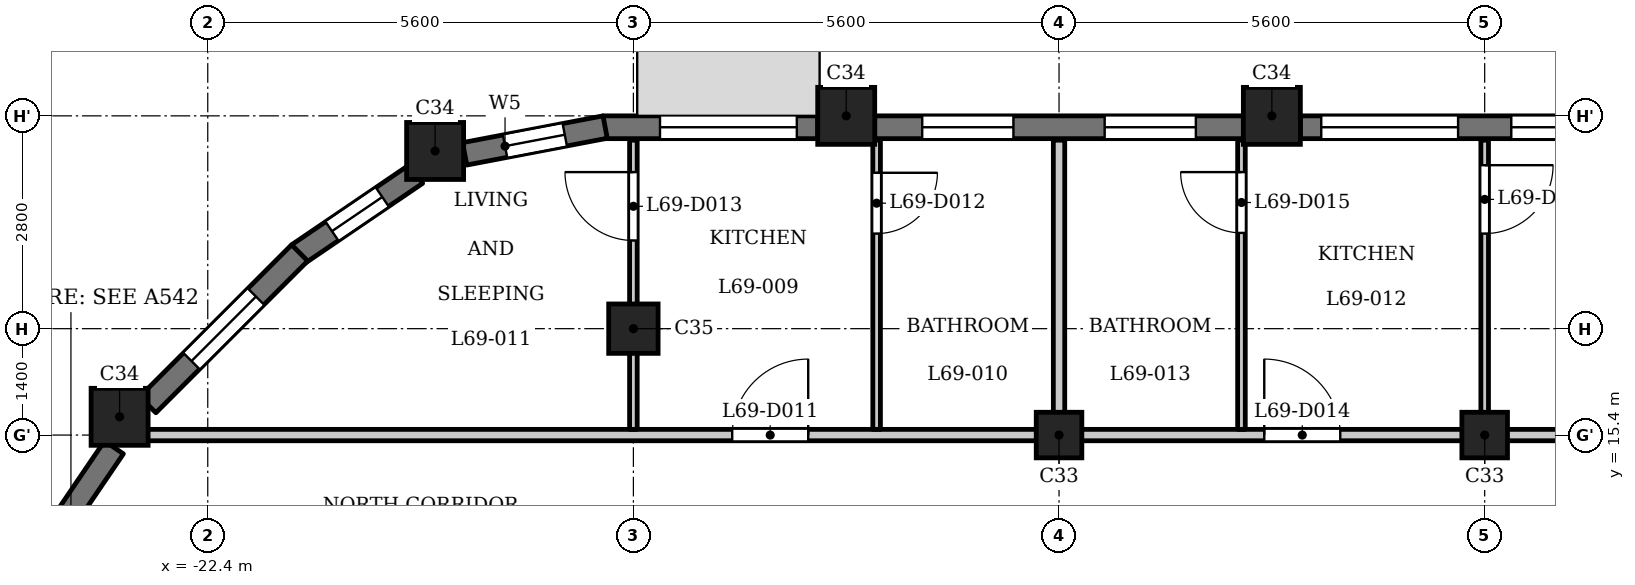
"""IFC4 building model, lengths in metres.
Left out: names, types, materials, properties, quantities, classifications, styles, units other than length and angle.
Written with IfcOpenShell. Run it as: python <this file> out.ifc"""

import sys

from ifc_helpers import new_model, si_unit, direction, frame, frame_2d, origin, origin_2d, place, context, subcontext, project, spatial, rectangle, extrude, element, fill, save


model = new_model("IFC4")
c1 = context("Model", 3, precision=1e-05, world=origin(), true_north=direction((0.0, 1.0)))
c2 = subcontext(c1, "Body", "Model", "MODEL_VIEW")
j1 = project(units=[si_unit("LENGTHUNIT", "METRE"), si_unit("PLANEANGLEUNIT", "RADIAN")], contexts=[c1])
p1 = place(None, origin())
s1 = spatial("IfcSite", under=j1, at=p1, CompositionType="ELEMENT")
p2 = place(p1, origin())
s2 = spatial("IfcBuilding", under=s1, at=p2, CompositionType="ELEMENT")
p3 = place(p2, frame((0.0, 0.0, 266.2)))
s3 = spatial("IfcBuildingStorey", under=s2, at=p3, CompositionType="ELEMENT", Elevation=266.2)
for number, where, z_axis, x_axis in (
    (1, (-8.4, 19.6, 0.0), (0.0, 0.0, 1.0), (1.0, 0.0, 0.0)),
    (2, (-14.0, 19.6, 0.0), (0.0, 0.0, 1.0), (1.0, 0.0, 0.0)),
    (3, (-19.409, 19.138, 0.0), (0.0, 0.0, 1.0), (1.0, 0.0, 0.0)),
    (4, (-23.56, 15.64, 0.0), (0.0, 0.0, 1.0), (1.0, 0.0, 0.0)),
):
    element("IfcColumn", number, at=place(p3, frame(where, z_axis=z_axis, x_axis=x_axis)), inside=s3, PredefinedType="COLUMN", context=c2, shape_type="SweptSolid", body=[
        extrude(rectangle(XDim=0.75, YDim=0.75, at=origin_2d()), origin(), (0.0, 0.0, 1.0), 3.5),
    ])
p4 = place(p3, frame((-16.8, 16.8, 0.0), z_axis=(0.0, 0.0, 1.0), x_axis=(1.0, 0.0, 0.0)))
e5 = element("IfcColumn", 5, at=p4, inside=s3, PredefinedType="COLUMN", context=c2, shape_type="SweptSolid", body=[
    extrude(rectangle(XDim=0.65, YDim=0.65, at=origin_2d()), origin(), (0.0, 0.0, 1.0), 3.5),
])
for number, where, z_axis, x_axis in (
    (6, (-11.2, 15.4, 0.0), (0.0, 0.0, 1.0), (1.0, 0.0, 0.0)),
    (7, (-5.6, 15.4, 0.0), (0.0, 0.0, 1.0), (1.0, 0.0, 0.0)),
):
    element("IfcColumn", number, at=place(p3, frame(where, z_axis=z_axis, x_axis=x_axis)), inside=s3, PredefinedType="COLUMN", context=c2, shape_type="SweptSolid", body=[
        extrude(rectangle(XDim=0.6, YDim=0.6, at=origin_2d()), origin(), (0.0, 0.0, 1.0), 3.5),
    ])
p5 = place(p3, frame((-3.175, 19.45, 0.0), z_axis=(0.0, 0.0, 1.0), x_axis=(-1.0, 0.0, 0.0)))
e8 = element("IfcWall", 8, at=p5, inside=s3, PredefinedType="SOLIDWALL", context=c2, shape_type="SweptSolid", body=[
    extrude(rectangle(XDim=4.85, YDim=0.3, at=frame_2d((2.425, 0.0))), origin(), (0.0, 0.0, 1.0), 2.55),
])
p6 = place(p5, frame((0.275, 0.0, 0.9)))
e9 = element("IfcOpeningElement", 9, at=p6, cuts=e8, PredefinedType="OPENING", context=c2, shape_type="SweptSolid", body=[
    extrude(rectangle(XDim=1.8, YDim=1.25, at=frame_2d((0.9, 0.625))), frame((0.0, 0.16, 0.0), z_axis=(0.0, -1.0, 0.0), x_axis=(1.0, 0.0, 0.0)), (0.0, 0.0, 1.0), 0.32),
])
p7 = place(p5, frame((2.775, 0.0, 0.9)))
e10 = element("IfcOpeningElement", 10, at=p7, cuts=e8, PredefinedType="OPENING", context=c2, shape_type="SweptSolid", body=[
    extrude(rectangle(XDim=1.8, YDim=1.25, at=frame_2d((0.9, 0.625))), frame((0.0, 0.16, 0.0), z_axis=(0.0, -1.0, 0.0), x_axis=(1.0, 0.0, 0.0)), (0.0, 0.0, 1.0), 0.32),
])
p8 = place(p3, frame((-8.775, 19.45, 0.0), z_axis=(0.0, 0.0, 1.0), x_axis=(-1.0, 0.0, 0.0)))
e11 = element("IfcWall", 11, at=p8, inside=s3, PredefinedType="SOLIDWALL", context=c2, shape_type="SweptSolid", body=[
    extrude(rectangle(XDim=4.85, YDim=0.3, at=frame_2d((2.425, 0.0))), origin(), (0.0, 0.0, 1.0), 2.55),
])
p9 = place(p8, frame((0.625, 0.0, 0.6)))
e12 = element("IfcOpeningElement", 12, at=p9, cuts=e11, PredefinedType="OPENING", context=c2, shape_type="SweptSolid", body=[
    extrude(rectangle(XDim=1.2, YDim=1.55, at=frame_2d((0.6, 0.775))), frame((0.0, 0.16, 0.0), z_axis=(0.0, -1.0, 0.0), x_axis=(1.0, 0.0, 0.0)), (0.0, 0.0, 1.0), 0.32),
])
p10 = place(p8, frame((3.025, 0.0, 0.6)))
e13 = element("IfcOpeningElement", 13, at=p10, cuts=e11, PredefinedType="OPENING", context=c2, shape_type="SweptSolid", body=[
    extrude(rectangle(XDim=1.2, YDim=1.55, at=frame_2d((0.6, 0.775))), frame((0.0, 0.16, 0.0), z_axis=(0.0, -1.0, 0.0), x_axis=(1.0, 0.0, 0.0)), (0.0, 0.0, 1.0), 0.32),
])
p11 = place(p3, frame((-14.375, 19.45, 0.0), z_axis=(0.0, 0.0, 1.0), x_axis=(-1.0, 0.0, 0.0)))
e14 = element("IfcWall", 14, at=p11, inside=s3, PredefinedType="SOLIDWALL", context=c2, shape_type="SweptSolid", body=[
    extrude(rectangle(XDim=2.825, YDim=0.3, at=frame_2d((1.413, 0.0))), origin(), (0.0, 0.0, 1.0), 2.55),
])
p12 = place(p11, frame((0.275, 0.0, 0.9)))
e15 = element("IfcOpeningElement", 15, at=p12, cuts=e14, PredefinedType="OPENING", context=c2, shape_type="SweptSolid", body=[
    extrude(rectangle(XDim=1.8, YDim=1.25, at=frame_2d((0.9, 0.625))), frame((0.0, 0.16, 0.0), z_axis=(0.0, -1.0, 0.0), x_axis=(1.0, 0.0, 0.0)), (0.0, 0.0, 1.0), 0.32),
])
p13 = place(p3, frame((-17.172, 19.453, 0.0), z_axis=(0.0, 0.0, 1.0), x_axis=(-0.982284001233, -0.187398348234, 0.0)))
e16 = element("IfcWall", 16, at=p13, inside=s3, PredefinedType="SOLIDWALL", context=c2, shape_type="SweptSolid", body=[
    extrude(rectangle(XDim=1.881, YDim=0.3, at=frame_2d((0.941, 0.0))), origin(), (0.0, 0.0, 1.0), 2.55),
])
p14 = place(p13, frame((0.541, 0.0, 0.6)))
e17 = element("IfcOpeningElement", 17, at=p14, cuts=e16, PredefinedType="OPENING", context=c2, shape_type="SweptSolid", body=[
    extrude(rectangle(XDim=0.8, YDim=1.55, at=frame_2d((0.4, 0.775))), frame((0.0, 0.16, 0.0), z_axis=(0.0, -1.0, 0.0), x_axis=(1.0, 0.0, 0.0)), (0.0, 0.0, 1.0), 0.32),
])
p15 = place(p3, frame((-19.657, 18.836, 0.0), z_axis=(0.0, 0.0, 1.0), x_axis=(-0.82704477487, -0.562136051469, 0.0)))
e18 = element("IfcWall", 18, at=p15, inside=s3, PredefinedType="SOLIDWALL", context=c2, shape_type="SweptSolid", body=[
    extrude(rectangle(XDim=1.881, YDim=0.3, at=frame_2d((0.94, 0.0))), origin(), (0.0, 0.0, 1.0), 2.55),
])
p16 = place(p15, frame((0.541, 0.0, 0.6)))
e19 = element("IfcOpeningElement", 19, at=p16, cuts=e18, PredefinedType="OPENING", context=c2, shape_type="SweptSolid", body=[
    extrude(rectangle(XDim=0.8, YDim=1.55, at=frame_2d((0.4, 0.775))), frame((0.0, 0.16, 0.0), z_axis=(0.0, -1.0, 0.0), x_axis=(1.0, 0.0, 0.0)), (0.0, 0.0, 1.0), 0.32),
])
p17 = place(p3, frame((-21.191, 17.797, 0.0), z_axis=(0.0, 0.0, 1.0), x_axis=(-0.707106781187, -0.707106781187, 0.0)))
e20 = element("IfcWall", 20, at=p17, inside=s3, PredefinedType="SOLIDWALL", context=c2, shape_type="SweptSolid", body=[
    extrude(rectangle(XDim=2.825, YDim=0.3, at=frame_2d((1.413, 0.0))), origin(), (0.0, 0.0, 1.0), 2.55),
])
p18 = place(p17, frame((0.812, 0.0, 0.6)))
e21 = element("IfcOpeningElement", 21, at=p18, cuts=e20, PredefinedType="OPENING", context=c2, shape_type="SweptSolid", body=[
    extrude(rectangle(XDim=1.2, YDim=1.55, at=frame_2d((0.6, 0.775))), frame((0.0, 0.16, 0.0), z_axis=(0.0, -1.0, 0.0), x_axis=(1.0, 0.0, 0.0)), (0.0, 0.0, 1.0), 0.32),
])
p19 = place(p3, frame((-23.634, 15.237, 0.0), z_axis=(0.0, 0.0, 1.0), x_axis=(-0.562099454787, -0.827069648173, 0.0)))
e22 = element("IfcWall", 22, at=p19, inside=s3, PredefinedType="SOLIDWALL", context=c2, shape_type="SweptSolid", body=[
    extrude(rectangle(XDim=1.427, YDim=0.3, at=frame_2d((0.714, 0.0))), origin(), (0.0, 0.0, 1.0), 2.55),
])
p20 = place(p3, frame((-23.55, 15.4, 0.0), z_axis=(0.0, 0.0, 1.0), x_axis=(1.0, 0.0, 0.0)))
e23 = element("IfcWall", 23, at=p20, inside=s3, PredefinedType="PARTITIONING", context=c2, shape_type="SweptSolid", body=[
    extrude(rectangle(XDim=46.872, YDim=0.15, at=frame_2d((23.436, 0.0))), origin(), (0.0, 0.0, 1.0), 3.2),
])
p21 = place(p20, frame((8.05, 0.0, 0.0)))
e24 = element("IfcOpeningElement", 24, at=p21, cuts=e23, PredefinedType="OPENING", context=c2, shape_type="SweptSolid", body=[
    extrude(rectangle(XDim=1.0, YDim=2.1, at=frame_2d((0.5, 1.05))), frame((0.0, 0.085, 0.0), z_axis=(0.0, -1.0, 0.0), x_axis=(1.0, 0.0, 0.0)), (0.0, 0.0, 1.0), 0.17),
])
p22 = place(p20, frame((15.05, 0.0, 0.0)))
e25 = element("IfcOpeningElement", 25, at=p22, cuts=e23, PredefinedType="OPENING", context=c2, shape_type="SweptSolid", body=[
    extrude(rectangle(XDim=1.0, YDim=2.1, at=frame_2d((0.5, 1.05))), frame((0.0, 0.085, 0.0), z_axis=(0.0, -1.0, 0.0), x_axis=(1.0, 0.0, 0.0)), (0.0, 0.0, 1.0), 0.17),
])
p23 = place(p20, frame((26.25, 0.0, 0.0)))
e26 = element("IfcOpeningElement", 26, at=p23, cuts=e23, PredefinedType="OPENING", context=c2, shape_type="SweptSolid", body=[
    extrude(rectangle(XDim=1.0, YDim=2.1, at=frame_2d((0.5, 1.05))), frame((0.0, 0.085, 0.0), z_axis=(0.0, -1.0, 0.0), x_axis=(1.0, 0.0, 0.0)), (0.0, 0.0, 1.0), 0.17),
])
p24 = place(p20, frame((38.2, 0.0, 0.0)))
e27 = element("IfcOpeningElement", 27, at=p24, cuts=e23, PredefinedType="OPENING", context=c2, shape_type="SweptSolid", body=[
    extrude(rectangle(XDim=1.0, YDim=2.1, at=frame_2d((0.5, 1.05))), frame((0.0, 0.085, 0.0), z_axis=(0.0, -1.0, 0.0), x_axis=(1.0, 0.0, 0.0)), (0.0, 0.0, 1.0), 0.17),
])
p25 = place(p3, frame((-16.8, 15.475, 0.0), z_axis=(0.0, 0.0, 1.0), x_axis=(0.0, 1.0, 0.0)))
e28 = element("IfcWall", 28, at=p25, inside=s3, PredefinedType="PARTITIONING", context=c2, shape_type="SweptSolid", body=[
    extrude(rectangle(XDim=3.805, YDim=0.1, at=frame_2d((1.902, 0.0))), origin(), (0.0, 0.0, 1.0), 3.2),
])
p26 = place(p25, frame((2.485, 0.0, 0.0)))
e29 = element("IfcOpeningElement", 29, at=p26, cuts=e28, PredefinedType="OPENING", context=c2, shape_type="SweptSolid", body=[
    extrude(rectangle(XDim=0.9, YDim=2.1, at=frame_2d((0.45, 1.05))), frame((0.0, 0.06, 0.0), z_axis=(0.0, -1.0, 0.0), x_axis=(1.0, 0.0, 0.0)), (0.0, 0.0, 1.0), 0.12),
])
p27 = place(p3, frame((-13.6, 15.475, 0.0), z_axis=(0.0, 0.0, 1.0), x_axis=(0.0, 1.0, 0.0)))
e30 = element("IfcWall", 30, at=p27, inside=s3, PredefinedType="PARTITIONING", context=c2, shape_type="SweptSolid", body=[
    extrude(rectangle(XDim=3.805, YDim=0.1, at=frame_2d((1.902, 0.0))), origin(), (0.0, 0.0, 1.0), 3.2),
])
p28 = place(p27, frame((2.576, 0.0, 0.0)))
e31 = element("IfcOpeningElement", 31, at=p28, cuts=e30, PredefinedType="OPENING", context=c2, shape_type="SweptSolid", body=[
    extrude(rectangle(XDim=0.8, YDim=2.1, at=frame_2d((0.4, 1.05))), frame((0.0, 0.06, 0.0), z_axis=(0.0, -1.0, 0.0), x_axis=(1.0, 0.0, 0.0)), (0.0, 0.0, 1.0), 0.12),
])
p29 = place(p3, frame((-11.2, 15.475, 0.0), z_axis=(0.0, 0.0, 1.0), x_axis=(0.0, 1.0, 0.0)))
e32 = element("IfcWall", 32, at=p29, inside=s3, PredefinedType="PARTITIONING", context=c2, shape_type="SweptSolid", body=[
    extrude(rectangle(XDim=3.805, YDim=0.15, at=frame_2d((1.902, 0.0))), origin(), (0.0, 0.0, 1.0), 3.2),
])
p30 = place(p3, frame((-8.8, 15.475, 0.0), z_axis=(0.0, 0.0, 1.0), x_axis=(0.0, 1.0, 0.0)))
e33 = element("IfcWall", 33, at=p30, inside=s3, PredefinedType="PARTITIONING", context=c2, shape_type="SweptSolid", body=[
    extrude(rectangle(XDim=3.805, YDim=0.1, at=frame_2d((1.902, 0.0))), origin(), (0.0, 0.0, 1.0), 3.2),
])
p31 = place(p30, frame((2.585, 0.0, 0.0)))
e34 = element("IfcOpeningElement", 34, at=p31, cuts=e33, PredefinedType="OPENING", context=c2, shape_type="SweptSolid", body=[
    extrude(rectangle(XDim=0.8, YDim=2.1, at=frame_2d((0.4, 1.05))), frame((0.0, 0.06, 0.0), z_axis=(0.0, -1.0, 0.0), x_axis=(1.0, 0.0, 0.0)), (0.0, 0.0, 1.0), 0.12),
])
p32 = place(p3, frame((-5.6, 15.475, 0.0), z_axis=(0.0, 0.0, 1.0), x_axis=(0.0, 1.0, 0.0)))
e35 = element("IfcWall", 35, at=p32, inside=s3, PredefinedType="PARTITIONING", context=c2, shape_type="SweptSolid", body=[
    extrude(rectangle(XDim=3.805, YDim=0.1, at=frame_2d((1.902, 0.0))), origin(), (0.0, 0.0, 1.0), 3.2),
])
p33 = place(p32, frame((2.576, 0.0, 0.0)))
e36 = element("IfcOpeningElement", 36, at=p33, cuts=e35, PredefinedType="OPENING", context=c2, shape_type="SweptSolid", body=[
    extrude(rectangle(XDim=0.9, YDim=2.1, at=frame_2d((0.45, 1.05))), frame((0.0, 0.06, 0.0), z_axis=(0.0, -1.0, 0.0), x_axis=(1.0, 0.0, 0.0)), (0.0, 0.0, 1.0), 0.12),
])
p34 = place(p21, origin())
e37 = element("IfcDoor", 37, at=p34, inside=s3, OperationType="SINGLE_SWING_LEFT", PredefinedType="DOOR", context=c2, shape_type="SweptSolid", body=[
    extrude(rectangle(XDim=1.0, YDim=2.1, at=frame_2d((0.5, 1.05))), frame((0.0, 0.025, 0.0), z_axis=(0.0, -1.0, 0.0), x_axis=(1.0, 0.0, 0.0)), (0.0, 0.0, 1.0), 0.05),
])
fill(e24, e37)
p35 = place(p28, origin())
e38 = element("IfcDoor", 38, at=p35, inside=s3, OperationType="SINGLE_SWING_RIGHT", PredefinedType="DOOR", context=c2, shape_type="SweptSolid", body=[
    extrude(rectangle(XDim=0.8, YDim=2.1, at=frame_2d((0.4, 1.05))), frame((0.0, 0.025, 0.0), z_axis=(0.0, -1.0, 0.0), x_axis=(1.0, 0.0, 0.0)), (0.0, 0.0, 1.0), 0.05),
])
fill(e31, e38)
p36 = place(p26, origin())
e39 = element("IfcDoor", 39, at=p36, inside=s3, OperationType="SINGLE_SWING_LEFT", PredefinedType="DOOR", context=c2, shape_type="SweptSolid", body=[
    extrude(rectangle(XDim=0.9, YDim=2.1, at=frame_2d((0.45, 1.05))), frame((0.0, 0.025, 0.0), z_axis=(0.0, -1.0, 0.0), x_axis=(1.0, 0.0, 0.0)), (0.0, 0.0, 1.0), 0.05),
])
fill(e29, e39)
p37 = place(p22, origin())
e40 = element("IfcDoor", 40, at=p37, inside=s3, OperationType="SINGLE_SWING_RIGHT", PredefinedType="DOOR", context=c2, shape_type="SweptSolid", body=[
    extrude(rectangle(XDim=1.0, YDim=2.1, at=frame_2d((0.5, 1.05))), frame((0.0, 0.025, 0.0), z_axis=(0.0, -1.0, 0.0), x_axis=(1.0, 0.0, 0.0)), (0.0, 0.0, 1.0), 0.05),
])
fill(e25, e40)
p38 = place(p31, origin())
e41 = element("IfcDoor", 41, at=p38, inside=s3, OperationType="SINGLE_SWING_LEFT", PredefinedType="DOOR", context=c2, shape_type="SweptSolid", body=[
    extrude(rectangle(XDim=0.8, YDim=2.1, at=frame_2d((0.4, 1.05))), frame((0.0, 0.025, 0.0), z_axis=(0.0, -1.0, 0.0), x_axis=(1.0, 0.0, 0.0)), (0.0, 0.0, 1.0), 0.05),
])
fill(e34, e41)
p39 = place(p33, origin())
e42 = element("IfcDoor", 42, at=p39, inside=s3, OperationType="SINGLE_SWING_RIGHT", PredefinedType="DOOR", context=c2, shape_type="SweptSolid", body=[
    extrude(rectangle(XDim=0.9, YDim=2.1, at=frame_2d((0.45, 1.05))), frame((0.0, 0.025, 0.0), z_axis=(0.0, -1.0, 0.0), x_axis=(1.0, 0.0, 0.0)), (0.0, 0.0, 1.0), 0.05),
])
fill(e36, e42)
p40 = place(p6, origin())
e43 = element("IfcWindow", 43, at=p40, inside=s3, PartitioningType="SINGLE_PANEL", PredefinedType="WINDOW", context=c2, shape_type="SweptSolid", body=[
    extrude(rectangle(XDim=1.8, YDim=1.25, at=frame_2d((0.9, 0.625))), frame((0.0, 0.03, 0.0), z_axis=(0.0, -1.0, 0.0), x_axis=(1.0, 0.0, 0.0)), (0.0, 0.0, 1.0), 0.06),
])
fill(e9, e43)
p41 = place(p7, origin())
e44 = element("IfcWindow", 44, at=p41, inside=s3, PartitioningType="SINGLE_PANEL", PredefinedType="WINDOW", context=c2, shape_type="SweptSolid", body=[
    extrude(rectangle(XDim=1.8, YDim=1.25, at=frame_2d((0.9, 0.625))), frame((0.0, 0.03, 0.0), z_axis=(0.0, -1.0, 0.0), x_axis=(1.0, 0.0, 0.0)), (0.0, 0.0, 1.0), 0.06),
])
fill(e10, e44)
p42 = place(p9, origin())
e45 = element("IfcWindow", 45, at=p42, inside=s3, PartitioningType="SINGLE_PANEL", PredefinedType="WINDOW", context=c2, shape_type="SweptSolid", body=[
    extrude(rectangle(XDim=1.2, YDim=1.55, at=frame_2d((0.6, 0.775))), frame((0.0, 0.03, 0.0), z_axis=(0.0, -1.0, 0.0), x_axis=(1.0, 0.0, 0.0)), (0.0, 0.0, 1.0), 0.06),
])
fill(e12, e45)
p43 = place(p10, origin())
e46 = element("IfcWindow", 46, at=p43, inside=s3, PartitioningType="SINGLE_PANEL", PredefinedType="WINDOW", context=c2, shape_type="SweptSolid", body=[
    extrude(rectangle(XDim=1.2, YDim=1.55, at=frame_2d((0.6, 0.775))), frame((0.0, 0.03, 0.0), z_axis=(0.0, -1.0, 0.0), x_axis=(1.0, 0.0, 0.0)), (0.0, 0.0, 1.0), 0.06),
])
fill(e13, e46)
p44 = place(p12, origin())
e47 = element("IfcWindow", 47, at=p44, inside=s3, PartitioningType="SINGLE_PANEL", PredefinedType="WINDOW", context=c2, shape_type="SweptSolid", body=[
    extrude(rectangle(XDim=1.8, YDim=1.25, at=frame_2d((0.9, 0.625))), frame((0.0, 0.03, 0.0), z_axis=(0.0, -1.0, 0.0), x_axis=(1.0, 0.0, 0.0)), (0.0, 0.0, 1.0), 0.06),
])
fill(e15, e47)
p45 = place(p14, origin())
e48 = element("IfcWindow", 48, at=p45, inside=s3, PartitioningType="SINGLE_PANEL", PredefinedType="WINDOW", context=c2, shape_type="SweptSolid", body=[
    extrude(rectangle(XDim=0.8, YDim=1.55, at=frame_2d((0.4, 0.775))), frame((0.0, 0.03, 0.0), z_axis=(0.0, -1.0, 0.0), x_axis=(1.0, 0.0, 0.0)), (0.0, 0.0, 1.0), 0.06),
])
fill(e17, e48)
p46 = place(p16, origin())
e49 = element("IfcWindow", 49, at=p46, inside=s3, PartitioningType="SINGLE_PANEL", PredefinedType="WINDOW", context=c2, shape_type="SweptSolid", body=[
    extrude(rectangle(XDim=0.8, YDim=1.55, at=frame_2d((0.4, 0.775))), frame((0.0, 0.03, 0.0), z_axis=(0.0, -1.0, 0.0), x_axis=(1.0, 0.0, 0.0)), (0.0, 0.0, 1.0), 0.06),
])
fill(e19, e49)
p47 = place(p18, origin())
e50 = element("IfcWindow", 50, at=p47, inside=s3, PartitioningType="SINGLE_PANEL", PredefinedType="WINDOW", context=c2, shape_type="SweptSolid", body=[
    extrude(rectangle(XDim=1.2, YDim=1.55, at=frame_2d((0.6, 0.775))), frame((0.0, 0.03, 0.0), z_axis=(0.0, -1.0, 0.0), x_axis=(1.0, 0.0, 0.0)), (0.0, 0.0, 1.0), 0.06),
])
fill(e21, e50)
save(model, sys.argv[1])
